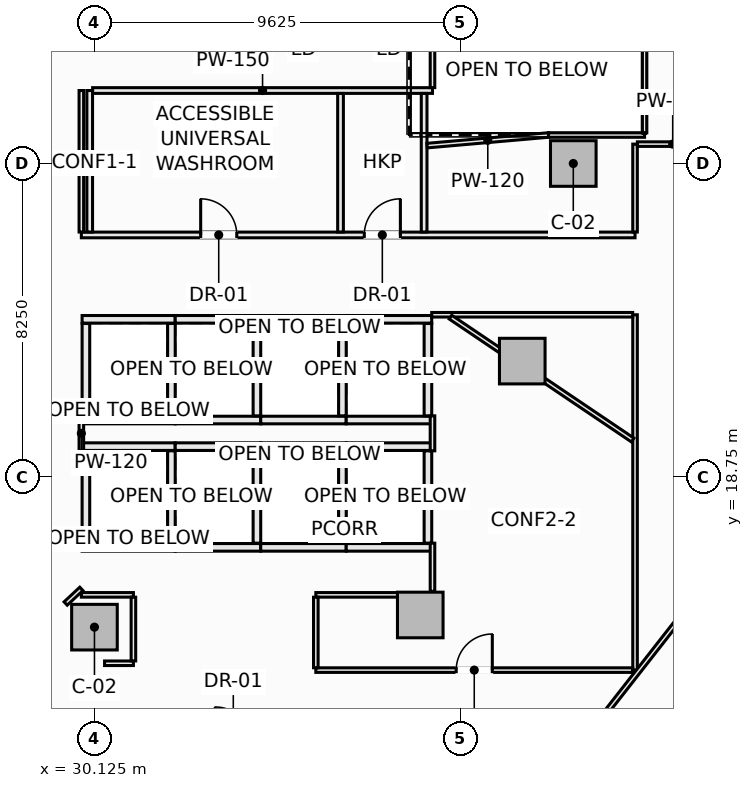
"""IFC4 building model, lengths in metres.
Left out: names, types, materials, properties, quantities, classifications, styles, units other than length and angle.
Written with IfcOpenShell. Run it as: python <this file> out.ifc"""

import sys

from ifc_helpers import new_model, si_unit, direction, frame, frame_2d, origin, origin_2d, place, context, subcontext, project, spatial, rectangle, extrude, element, fill, save


model = new_model("IFC4")
c1 = context("Model", 3, precision=1e-05, world=origin(), true_north=direction((0.0, 1.0)))
c2 = subcontext(c1, "Body", "Model", "MODEL_VIEW")
j1 = project(units=[si_unit("LENGTHUNIT", "METRE"), si_unit("PLANEANGLEUNIT", "RADIAN")], contexts=[c1])
p1 = place(None, origin())
s1 = spatial("IfcSite", under=j1, at=p1, CompositionType="ELEMENT")
p2 = place(p1, origin())
s2 = spatial("IfcBuilding", under=s1, at=p2, CompositionType="ELEMENT")
p3 = place(p2, frame((0.0, 0.0, 21.0)))
s3 = spatial("IfcBuildingStorey", under=s2, at=p3, CompositionType="ELEMENT", Elevation=21.0)
for number, where, z_axis, x_axis in (
    (1, (42.725, 27.0, -0.24), (0.0, 0.0, 1.0), (1.0, 0.0, 0.0)),
    (2, (30.125, 14.8, -0.24), (0.0, 0.0, 1.0), (1.0, 0.0, 0.0)),
    (3, (38.698, 15.121, -0.24), (0.0, 0.0, 1.0), (1.0, 0.0, 0.0)),
    (4, (41.382, 21.801, -0.24), (0.0, 0.0, 1.0), (1.0, 0.0, 0.0)),
):
    element("IfcColumn", number, at=place(p3, frame(where, z_axis=z_axis, x_axis=x_axis)), inside=s3, PredefinedType="COLUMN", context=c2, shape_type="SweptSolid", body=[
        extrude(rectangle(XDim=1.2, YDim=1.2, at=origin_2d()), origin(), (0.0, 0.0, 1.0), 5.46),
    ])
for number, where, z_axis, x_axis in (
    (5, (29.8, 19.55, 0.0), (0.0, 0.0, 1.0), (1.0, 0.0, 0.0)),
    (6, (29.8, 16.9, 0.0), (0.0, 0.0, 1.0), (1.0, 0.0, 0.0)),
):
    element("IfcWall", number, at=place(p3, frame(where, z_axis=z_axis, x_axis=x_axis)), inside=s3, PredefinedType="SOLIDWALL", context=c2, shape_type="SweptSolid", body=[
        extrude(rectangle(XDim=2.45, YDim=0.2, at=frame_2d((1.225, 0.0))), origin(), (0.0, 0.0, 1.0), 5.22),
    ])
for number, where, z_axis, x_axis in (
    (7, (29.9, 17.01, 0.0), (0.0, 0.0, 1.0), (0.0, 1.0, 0.0)),
    (8, (32.15, 17.01, 0.0), (0.0, 0.0, 1.0), (0.0, 1.0, 0.0)),
):
    element("IfcWall", number, at=place(p3, frame(where, z_axis=z_axis, x_axis=x_axis)), inside=s3, PredefinedType="SOLIDWALL", context=c2, shape_type="SweptSolid", body=[
        extrude(rectangle(XDim=2.43, YDim=0.2, at=frame_2d((1.215, 0.0))), origin(), (0.0, 0.0, 1.0), 5.22),
    ])
for number, where, z_axis, x_axis in (
    (9, (32.25, 19.55, 0.0), (0.0, 0.0, 1.0), (1.0, 0.0, 0.0)),
    (10, (32.25, 16.9, 0.0), (0.0, 0.0, 1.0), (1.0, 0.0, 0.0)),
):
    element("IfcWall", number, at=place(p3, frame(where, z_axis=z_axis, x_axis=x_axis)), inside=s3, PredefinedType="SOLIDWALL", context=c2, shape_type="SweptSolid", body=[
        extrude(rectangle(XDim=2.25, YDim=0.2, at=frame_2d((1.125, 0.0))), origin(), (0.0, 0.0, 1.0), 5.22),
    ])
p4 = place(p3, frame((34.4, 17.01, 0.0), z_axis=(0.0, 0.0, 1.0), x_axis=(0.0, 1.0, 0.0)))
e11 = element("IfcWall", 11, at=p4, inside=s3, PredefinedType="SOLIDWALL", context=c2, shape_type="SweptSolid", body=[
    extrude(rectangle(XDim=2.43, YDim=0.2, at=frame_2d((1.215, 0.0))), origin(), (0.0, 0.0, 1.0), 5.22),
])
for number, where, z_axis, x_axis in (
    (12, (34.5, 19.55, 0.0), (0.0, 0.0, 1.0), (1.0, 0.0, 0.0)),
    (13, (34.5, 16.9, 0.0), (0.0, 0.0, 1.0), (1.0, 0.0, 0.0)),
):
    element("IfcWall", number, at=place(p3, frame(where, z_axis=z_axis, x_axis=x_axis)), inside=s3, PredefinedType="SOLIDWALL", context=c2, shape_type="SweptSolid", body=[
        extrude(rectangle(XDim=2.25, YDim=0.2, at=frame_2d((1.125, 0.0))), origin(), (0.0, 0.0, 1.0), 5.22),
    ])
p5 = place(p3, frame((36.65, 17.01, 0.0), z_axis=(0.0, 0.0, 1.0), x_axis=(0.0, 1.0, 0.0)))
e14 = element("IfcWall", 14, at=p5, inside=s3, PredefinedType="SOLIDWALL", context=c2, shape_type="SweptSolid", body=[
    extrude(rectangle(XDim=2.43, YDim=0.2, at=frame_2d((1.215, 0.0))), origin(), (0.0, 0.0, 1.0), 5.22),
])
for number, where, z_axis, x_axis in (
    (15, (36.75, 19.55, 0.0), (0.0, 0.0, 1.0), (1.0, 0.0, 0.0)),
    (16, (36.75, 16.9, 0.0), (0.0, 0.0, 1.0), (1.0, 0.0, 0.0)),
):
    element("IfcWall", number, at=place(p3, frame(where, z_axis=z_axis, x_axis=x_axis)), inside=s3, PredefinedType="SOLIDWALL", context=c2, shape_type="SweptSolid", body=[
        extrude(rectangle(XDim=2.25, YDim=0.2, at=frame_2d((1.125, 0.0))), origin(), (0.0, 0.0, 1.0), 5.22),
    ])
p6 = place(p3, frame((38.9, 17.01, 0.0), z_axis=(0.0, 0.0, 1.0), x_axis=(0.0, 1.0, 0.0)))
e17 = element("IfcWall", 17, at=p6, inside=s3, PredefinedType="SOLIDWALL", context=c2, shape_type="SweptSolid", body=[
    extrude(rectangle(XDim=2.43, YDim=0.2, at=frame_2d((1.215, 0.0))), origin(), (0.0, 0.0, 1.0), 5.22),
])
for number, where, z_axis, x_axis in (
    (18, (29.8, 22.9, 0.0), (0.0, 0.0, 1.0), (1.0, 0.0, 0.0)),
    (19, (29.8, 20.25, 0.0), (0.0, 0.0, 1.0), (1.0, 0.0, 0.0)),
):
    element("IfcWall", number, at=place(p3, frame(where, z_axis=z_axis, x_axis=x_axis)), inside=s3, PredefinedType="SOLIDWALL", context=c2, shape_type="SweptSolid", body=[
        extrude(rectangle(XDim=2.45, YDim=0.2, at=frame_2d((1.225, 0.0))), origin(), (0.0, 0.0, 1.0), 5.22),
    ])
for number, where, z_axis, x_axis in (
    (20, (29.9, 20.36, 0.0), (0.0, 0.0, 1.0), (0.0, 1.0, 0.0)),
    (21, (32.15, 20.36, 0.0), (0.0, 0.0, 1.0), (0.0, 1.0, 0.0)),
):
    element("IfcWall", number, at=place(p3, frame(where, z_axis=z_axis, x_axis=x_axis)), inside=s3, PredefinedType="SOLIDWALL", context=c2, shape_type="SweptSolid", body=[
        extrude(rectangle(XDim=2.43, YDim=0.2, at=frame_2d((1.215, 0.0))), origin(), (0.0, 0.0, 1.0), 5.22),
    ])
for number, where, z_axis, x_axis in (
    (22, (32.25, 22.9, 0.0), (0.0, 0.0, 1.0), (1.0, 0.0, 0.0)),
    (23, (32.25, 20.25, 0.0), (0.0, 0.0, 1.0), (1.0, 0.0, 0.0)),
):
    element("IfcWall", number, at=place(p3, frame(where, z_axis=z_axis, x_axis=x_axis)), inside=s3, PredefinedType="SOLIDWALL", context=c2, shape_type="SweptSolid", body=[
        extrude(rectangle(XDim=2.25, YDim=0.2, at=frame_2d((1.125, 0.0))), origin(), (0.0, 0.0, 1.0), 5.22),
    ])
p7 = place(p3, frame((34.4, 20.36, 0.0), z_axis=(0.0, 0.0, 1.0), x_axis=(0.0, 1.0, 0.0)))
e24 = element("IfcWall", 24, at=p7, inside=s3, PredefinedType="SOLIDWALL", context=c2, shape_type="SweptSolid", body=[
    extrude(rectangle(XDim=2.43, YDim=0.2, at=frame_2d((1.215, 0.0))), origin(), (0.0, 0.0, 1.0), 5.22),
])
for number, where, z_axis, x_axis in (
    (25, (34.5, 22.9, 0.0), (0.0, 0.0, 1.0), (1.0, 0.0, 0.0)),
    (26, (34.5, 20.25, 0.0), (0.0, 0.0, 1.0), (1.0, 0.0, 0.0)),
):
    element("IfcWall", number, at=place(p3, frame(where, z_axis=z_axis, x_axis=x_axis)), inside=s3, PredefinedType="SOLIDWALL", context=c2, shape_type="SweptSolid", body=[
        extrude(rectangle(XDim=2.25, YDim=0.2, at=frame_2d((1.125, 0.0))), origin(), (0.0, 0.0, 1.0), 5.22),
    ])
p8 = place(p3, frame((36.65, 20.36, 0.0), z_axis=(0.0, 0.0, 1.0), x_axis=(0.0, 1.0, 0.0)))
e27 = element("IfcWall", 27, at=p8, inside=s3, PredefinedType="SOLIDWALL", context=c2, shape_type="SweptSolid", body=[
    extrude(rectangle(XDim=2.43, YDim=0.2, at=frame_2d((1.215, 0.0))), origin(), (0.0, 0.0, 1.0), 5.22),
])
for number, where, z_axis, x_axis in (
    (28, (36.75, 22.9, 0.0), (0.0, 0.0, 1.0), (1.0, 0.0, 0.0)),
    (29, (36.75, 20.25, 0.0), (0.0, 0.0, 1.0), (1.0, 0.0, 0.0)),
):
    element("IfcWall", number, at=place(p3, frame(where, z_axis=z_axis, x_axis=x_axis)), inside=s3, PredefinedType="SOLIDWALL", context=c2, shape_type="SweptSolid", body=[
        extrude(rectangle(XDim=2.25, YDim=0.2, at=frame_2d((1.125, 0.0))), origin(), (0.0, 0.0, 1.0), 5.22),
    ])
p9 = place(p3, frame((38.9, 20.36, 0.0), z_axis=(0.0, 0.0, 1.0), x_axis=(0.0, 1.0, 0.0)))
e30 = element("IfcWall", 30, at=p9, inside=s3, PredefinedType="SOLIDWALL", context=c2, shape_type="SweptSolid", body=[
    extrude(rectangle(XDim=2.43, YDim=0.2, at=frame_2d((1.215, 0.0))), origin(), (0.0, 0.0, 1.0), 5.22),
])
p10 = place(p3, frame((29.78, 25.12, 0.0), z_axis=(0.0, 0.0, 1.0), x_axis=(1.0, 0.0, 0.0)))
e31 = element("IfcWall", 31, at=p10, inside=s3, PredefinedType="PARTITIONING", context=c2, shape_type="SweptSolid", body=[
    extrude(rectangle(XDim=14.57, YDim=0.15, at=frame_2d((7.285, 0.0))), origin(), (0.0, 0.0, 1.0), 5.22),
])
p11 = place(p10, frame((3.14, 0.0, 0.0)))
e32 = element("IfcOpeningElement", 32, at=p11, cuts=e31, PredefinedType="OPENING", context=c2, shape_type="SweptSolid", body=[
    extrude(rectangle(XDim=0.95, YDim=2.1, at=frame_2d((0.475, 1.05))), frame((0.0, 0.085, 0.0), z_axis=(0.0, -1.0, 0.0), x_axis=(1.0, 0.0, 0.0)), (0.0, 0.0, 1.0), 0.17),
])
p12 = place(p10, frame((7.445, 0.0, 0.0)))
e33 = element("IfcOpeningElement", 33, at=p12, cuts=e31, PredefinedType="OPENING", context=c2, shape_type="SweptSolid", body=[
    extrude(rectangle(XDim=0.95, YDim=2.1, at=frame_2d((0.475, 1.05))), frame((0.0, 0.085, 0.0), z_axis=(0.0, -1.0, 0.0), x_axis=(1.0, 0.0, 0.0)), (0.0, 0.0, 1.0), 0.17),
])
p13 = place(p3, frame((30.0, 25.197, 0.0), z_axis=(0.0, 0.0, 1.0), x_axis=(0.0, 1.0, 0.0)))
e34 = element("IfcWall", 34, at=p13, inside=s3, PredefinedType="PARTITIONING", context=c2, shape_type="SweptSolid", body=[
    extrude(rectangle(XDim=3.723, YDim=0.15, at=frame_2d((1.861, 0.0))), origin(), (0.0, 0.0, 1.0), 5.22),
])
p14 = place(p3, frame((30.077, 28.92, 0.0), z_axis=(0.0, 0.0, 1.0), x_axis=(1.0, 0.0, 0.0)))
e35 = element("IfcWall", 35, at=p14, inside=s3, PredefinedType="PARTITIONING", context=c2, shape_type="SweptSolid", body=[
    extrude(rectangle(XDim=8.943, YDim=0.15, at=frame_2d((4.472, 0.0))), origin(), (0.0, 0.0, 1.0), 5.22),
])
for number, where, z_axis, x_axis in (
    (36, (36.6, 25.197, 0.0), (0.0, 0.0, 1.0), (0.0, 1.0, 0.0)),
    (37, (38.8, 25.197, 0.0), (0.0, 0.0, 1.0), (0.0, 1.0, 0.0)),
):
    element("IfcWall", number, at=place(p3, frame(where, z_axis=z_axis, x_axis=x_axis)), inside=s3, PredefinedType="PARTITIONING", context=c2, shape_type="SweptSolid", body=[
        extrude(rectangle(XDim=3.646, YDim=0.15, at=frame_2d((1.823, 0.0))), origin(), (0.0, 0.0, 1.0), 5.22),
    ])
p15 = place(p3, frame((29.78, 19.44, 0.0), z_axis=(0.0, 0.0, 1.0), x_axis=(0.0, 1.0, 0.0)))
e38 = element("IfcWall", 38, at=p15, inside=s3, PredefinedType="PARTITIONING", context=c2, shape_type="SweptSolid", body=[
    extrude(rectangle(XDim=0.92, YDim=0.12, at=frame_2d((0.46, 0.0))), origin(), (0.0, 0.0, 1.0), 5.22),
])
p16 = place(p3, frame((29.78, 25.197, 0.0), z_axis=(0.0, 0.0, 1.0), x_axis=(0.0, 1.0, 0.0)))
e39 = element("IfcWall", 39, at=p16, inside=s3, PredefinedType="PARTITIONING", context=c2, shape_type="SweptSolid", body=[
    extrude(rectangle(XDim=3.723, YDim=0.12, at=frame_2d((1.861, 0.0))), origin(), (0.0, 0.0, 1.0), 5.22),
])
p17 = place(p3, frame((39.02, 15.742, 0.0), z_axis=(0.0, 0.0, 1.0), x_axis=(0.0, 1.0, 0.0)))
e40 = element("IfcWall", 40, at=p17, inside=s3, PredefinedType="PARTITIONING", context=c2, shape_type="SweptSolid", body=[
    extrude(rectangle(XDim=1.268, YDim=0.12, at=frame_2d((0.634, 0.0))), origin(), (0.0, 0.0, 1.0), 4.454),
])
p18 = place(p3, frame((39.02, 19.44, 0.0), z_axis=(0.0, 0.0, 1.0), x_axis=(0.0, 1.0, 0.0)))
e41 = element("IfcWall", 41, at=p18, inside=s3, PredefinedType="PARTITIONING", context=c2, shape_type="SweptSolid", body=[
    extrude(rectangle(XDim=0.92, YDim=0.12, at=frame_2d((0.46, 0.0))), origin(), (0.0, 0.0, 1.0), 5.22),
])
p19 = place(p3, frame((39.02, 28.997, 0.0), z_axis=(0.0, 0.0, 1.0), x_axis=(0.0, 1.0, 0.0)))
e42 = element("IfcWall", 42, at=p19, inside=s3, PredefinedType="PARTITIONING", context=c2, shape_type="SweptSolid", body=[
    extrude(rectangle(XDim=1.983, YDim=0.12, at=frame_2d((0.991, 0.0))), origin(), (0.0, 0.0, 1.0), 5.22),
])
p20 = place(p3, frame((44.35, 13.67, 0.0), z_axis=(0.0, 0.0, 1.0), x_axis=(0.0, 1.0, 0.0)))
e43 = element("IfcWall", 43, at=p20, inside=s3, PredefinedType="PARTITIONING", context=c2, shape_type="SweptSolid", body=[
    extrude(rectangle(XDim=9.35, YDim=0.12, at=frame_2d((4.675, 0.0))), origin(), (0.0, 0.0, 1.0), 5.22),
])
p21 = place(p3, frame((44.35, 25.197, 0.0), z_axis=(0.0, 0.0, 1.0), x_axis=(0.0, 1.0, 0.0)))
e44 = element("IfcWall", 44, at=p21, inside=s3, PredefinedType="PARTITIONING", context=c2, shape_type="SweptSolid", body=[
    extrude(rectangle(XDim=2.313, YDim=0.12, at=frame_2d((1.156, 0.0))), origin(), (0.0, 0.0, 1.0), 5.22),
])
p22 = place(p3, frame((44.412, 27.51, 0.0), z_axis=(0.0, 0.0, 1.0), x_axis=(1.0, 0.0, 0.0)))
e45 = element("IfcWall", 45, at=p22, inside=s3, PredefinedType="PARTITIONING", context=c2, shape_type="SweptSolid", body=[
    extrude(rectangle(XDim=1.858, YDim=0.12, at=frame_2d((0.929, 0.0))), origin(), (0.0, 0.0, 1.0), 5.22),
])
p23 = place(p3, frame((42.957, 11.75, 0.0), z_axis=(0.0, 0.0, 1.0), x_axis=(0.616428289415, 0.78741105149, 0.0)))
e46 = element("IfcWall", 46, at=p23, inside=s3, PredefinedType="PARTITIONING", context=c2, shape_type="SweptSolid", body=[
    extrude(rectangle(XDim=5.375, YDim=0.12, at=frame_2d((2.687, 0.0))), origin(), (0.0, 0.0, 1.0), 5.22),
])
p24 = place(p3, frame((35.95, 13.67, 0.0), z_axis=(0.0, 0.0, 1.0), x_axis=(1.0, 0.0, 0.0)))
e47 = element("IfcWall", 47, at=p24, inside=s3, PredefinedType="PARTITIONING", context=c2, shape_type="SweptSolid", body=[
    extrude(rectangle(XDim=8.338, YDim=0.12, at=frame_2d((4.169, 0.0))), origin(), (0.0, 0.0, 1.0), 5.22),
])
p25 = place(p24, frame((3.694, 0.0, 0.0)))
e48 = element("IfcOpeningElement", 48, at=p25, cuts=e47, PredefinedType="OPENING", context=c2, shape_type="SweptSolid", body=[
    extrude(rectangle(XDim=0.95, YDim=2.1, at=frame_2d((0.475, 1.05))), frame((0.0, 0.07, 0.0), z_axis=(0.0, -1.0, 0.0), x_axis=(1.0, 0.0, 0.0)), (0.0, 0.0, 1.0), 0.14),
])
p26 = place(p3, frame((29.78, 15.65, 0.0), z_axis=(0.0, 0.0, 1.0), x_axis=(1.0, 0.0, 0.0)))
e49 = element("IfcWall", 49, at=p26, inside=s3, PredefinedType="PARTITIONING", context=c2, shape_type="SweptSolid", body=[
    extrude(rectangle(XDim=1.37, YDim=0.12, at=frame_2d((0.685, 0.0))), origin(), (0.0, 0.0, 1.0), 5.22),
])
p27 = place(p3, frame((35.95, 15.65, 0.0), z_axis=(0.0, 0.0, 1.0), x_axis=(1.0, 0.0, 0.0)))
e50 = element("IfcWall", 50, at=p27, inside=s3, PredefinedType="PARTITIONING", context=c2, shape_type="SweptSolid", body=[
    extrude(rectangle(XDim=2.291, YDim=0.12, at=frame_2d((1.146, 0.0))), origin(), (0.0, 0.0, 1.0), 5.22),
])
p28 = place(p3, frame((35.95, 13.732, 0.0), z_axis=(0.0, 0.0, 1.0), x_axis=(0.0, 1.0, 0.0)))
e51 = element("IfcWall", 51, at=p28, inside=s3, PredefinedType="PARTITIONING", context=c2, shape_type="SweptSolid", body=[
    extrude(rectangle(XDim=1.856, YDim=0.12, at=frame_2d((0.928, 0.0))), origin(), (0.0, 0.0, 1.0), 5.22),
])
p29 = place(p3, frame((39.0, 23.02, 0.0), z_axis=(0.0, 0.0, 1.0), x_axis=(1.0, 0.0, 0.0)))
e52 = element("IfcWall", 52, at=p29, inside=s3, PredefinedType="PARTITIONING", context=c2, shape_type="SweptSolid", body=[
    extrude(rectangle(XDim=5.288, YDim=0.12, at=frame_2d((2.644, 0.0))), origin(), (0.0, 0.0, 1.0), 5.22),
])
p30 = place(p3, frame((29.367, 15.422, 0.0), z_axis=(0.0, 0.0, 1.0), x_axis=(0.730667420492, 0.682733564893, 0.0)))
e53 = element("IfcWall", 53, at=p30, inside=s3, PredefinedType="PARTITIONING", context=c2, shape_type="SweptSolid", body=[
    extrude(rectangle(XDim=0.565, YDim=0.12, at=frame_2d((0.283, 0.0))), origin(), (0.0, 0.0, 1.0), 5.22),
])
p31 = place(p3, frame((30.391, 13.85, 0.0), z_axis=(0.0, 0.0, 1.0), x_axis=(1.0, 0.0, 0.0)))
e54 = element("IfcWall", 54, at=p31, inside=s3, PredefinedType="PARTITIONING", context=c2, shape_type="SweptSolid", body=[
    extrude(rectangle(XDim=0.759, YDim=0.12, at=frame_2d((0.379, 0.0))), origin(), (0.0, 0.0, 1.0), 5.22),
])
p32 = place(p3, frame((31.15, 13.912, 0.0), z_axis=(0.0, 0.0, 1.0), x_axis=(0.0, 1.0, 0.0)))
e55 = element("IfcWall", 55, at=p32, inside=s3, PredefinedType="PARTITIONING", context=c2, shape_type="SweptSolid", body=[
    extrude(rectangle(XDim=1.676, YDim=0.12, at=frame_2d((0.838, 0.0))), origin(), (0.0, 0.0, 1.0), 5.22),
])
p33 = place(p3, frame((38.877, 27.471, 0.0), z_axis=(0.0, 0.0, 1.0), x_axis=(0.996203375591, 0.087056501541, 0.0)))
e56 = element("IfcWall", 56, at=p33, inside=s3, PredefinedType="PARTITIONING", context=c2, shape_type="SweptSolid", body=[
    extrude(rectangle(XDim=3.208, YDim=0.12, at=frame_2d((1.604, 0.0))), origin(), (0.0, 0.0, 1.0), 5.22),
])
p34 = place(p3, frame((42.073, 27.75, 0.0), z_axis=(0.0, 0.0, 1.0), x_axis=(1.0, 0.0, 0.0)))
e57 = element("IfcWall", 57, at=p34, inside=s3, PredefinedType="PARTITIONING", context=c2, shape_type="SweptSolid", body=[
    extrude(rectangle(XDim=2.527, YDim=0.12, at=frame_2d((1.264, 0.0))), origin(), (0.0, 0.0, 1.0), 5.22),
])
p35 = place(p3, frame((44.6, 27.812, 0.0), z_axis=(0.0, 0.0, 1.0), x_axis=(0.0, 1.0, 0.0)))
e58 = element("IfcWall", 58, at=p35, inside=s3, PredefinedType="PARTITIONING", context=c2, shape_type="SweptSolid", body=[
    extrude(rectangle(XDim=3.288, YDim=0.12, at=frame_2d((1.644, 0.0))), origin(), (0.0, 0.0, 1.0), 5.22),
])
p36 = place(p3, frame((39.493, 22.958, 0.0), z_axis=(0.0, 0.0, 1.0), x_axis=(0.829057566687, -0.559163259808, 0.0)))
e59 = element("IfcWall", 59, at=p36, inside=s3, PredefinedType="PARTITIONING", context=c2, shape_type="SweptSolid", body=[
    extrude(rectangle(XDim=5.784, YDim=0.12, at=frame_2d((2.892, 0.0))), origin(), (0.0, 0.0, 1.0), 4.855),
])
p37 = place(p11, origin())
e60 = element("IfcDoor", 60, at=p37, inside=s3, OperationType="SINGLE_SWING_LEFT", PredefinedType="DOOR", context=c2, shape_type="SweptSolid", body=[
    extrude(rectangle(XDim=0.95, YDim=2.1, at=frame_2d((0.475, 1.05))), frame((0.0, 0.025, 0.0), z_axis=(0.0, -1.0, 0.0), x_axis=(1.0, 0.0, 0.0)), (0.0, 0.0, 1.0), 0.05),
])
fill(e32, e60)
p38 = place(p12, origin())
e61 = element("IfcDoor", 61, at=p38, inside=s3, OperationType="SINGLE_SWING_RIGHT", PredefinedType="DOOR", context=c2, shape_type="SweptSolid", body=[
    extrude(rectangle(XDim=0.95, YDim=2.1, at=frame_2d((0.475, 1.05))), frame((0.0, 0.025, 0.0), z_axis=(0.0, -1.0, 0.0), x_axis=(1.0, 0.0, 0.0)), (0.0, 0.0, 1.0), 0.05),
])
fill(e33, e61)
p39 = place(p25, origin())
e62 = element("IfcDoor", 62, at=p39, inside=s3, OperationType="SINGLE_SWING_RIGHT", PredefinedType="DOOR", context=c2, shape_type="SweptSolid", body=[
    extrude(rectangle(XDim=0.95, YDim=2.1, at=frame_2d((0.475, 1.05))), frame((0.0, 0.025, 0.0), z_axis=(0.0, -1.0, 0.0), x_axis=(1.0, 0.0, 0.0)), (0.0, 0.0, 1.0), 0.05),
])
fill(e48, e62)
save(model, sys.argv[1])
